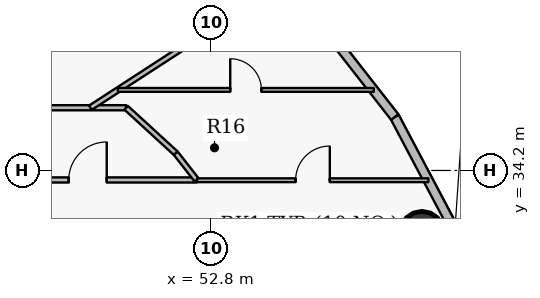
"""IFC4 building model, lengths in metres.
Left out: names, types, materials, properties, quantities, classifications, styles, units other than length and angle.
Written with IfcOpenShell. Run it as: python <this file> out.ifc"""

import sys

from ifc_helpers import new_model, si_unit, direction, frame, frame_2d, origin, origin_2d, place, context, subcontext, project, spatial, rectangle, hollow_circle, extrude, source, transform, mapped, element, fill, save


model = new_model("IFC4")
c1 = context("Model", 3, precision=1e-05, world=origin(), true_north=direction((0.0, 1.0)))
c2 = subcontext(c1, "Body", "Model", "MODEL_VIEW")
j1 = project(units=[si_unit("LENGTHUNIT", "METRE"), si_unit("PLANEANGLEUNIT", "RADIAN")], contexts=[c1])
p1 = place(None, origin())
s1 = spatial("IfcSite", under=j1, at=p1, CompositionType="ELEMENT")
p2 = place(p1, origin())
s2 = spatial("IfcBuilding", under=s1, at=p2, CompositionType="ELEMENT")
p3 = place(p2, frame((0.0, 0.0, 221.55)))
s3 = spatial("IfcBuildingStorey", under=s2, at=p3, CompositionType="ELEMENT", Elevation=221.55)
p4 = place(p3, frame((58.351, 32.549, 0.0), z_axis=(0.0, 0.0, 1.0), x_axis=(1.0, 0.0, 0.0)))
e1 = element("IfcColumn", 1, at=p4, inside=s3, PredefinedType="COLUMN", context=c2, shape_type="SweptSolid", body=[
    extrude(hollow_circle(Radius=0.575, WallThickness=0.036, at=origin_2d()), origin(), (0.0, 0.0, 1.0), 3.75),
])
p5 = place(p3, frame((57.636, 35.605, 0.0), z_axis=(0.0, 0.0, 1.0), x_axis=(0.46766049993, -0.883908172157, 0.0)))
e2 = element("IfcWall", 2, at=p5, inside=s3, PredefinedType="SOLIDWALL", context=c2, shape_type="SweptSolid", body=[
    extrude(rectangle(XDim=3.11, YDim=0.24, at=frame_2d((1.555, 0.0))), origin(), (0.0, 0.0, 1.0), 3.5),
])
p6 = place(p3, frame((55.648, 38.145, 0.0), z_axis=(0.0, 0.0, 1.0), x_axis=(0.616312344705, -0.787501805562, 0.0)))
e3 = element("IfcWall", 3, at=p6, inside=s3, PredefinedType="SOLIDWALL", context=c2, shape_type="SweptSolid", body=[
    extrude(rectangle(XDim=3.225, YDim=0.24, at=frame_2d((1.612, 0.0))), origin(), (0.0, 0.0, 1.0), 3.5),
])
p7 = place(p3, frame((24.35, 35.85, 0.0), z_axis=(0.0, 0.0, 1.0), x_axis=(1.0, 0.0, 0.0)))
e4 = element("IfcWall", 4, at=p7, inside=s3, PredefinedType="PARTITIONING", context=c2, shape_type="SweptSolid", body=[
    extrude(rectangle(XDim=26.218, YDim=0.135, at=frame_2d((13.109, 0.0))), origin(), (0.0, 0.0, 1.0), 2.935),
])
p8 = place(p7, frame((21.507, 0.0, 0.0)))
e5 = element("IfcOpeningElement", 5, at=p8, cuts=e4, PredefinedType="OPENING", context=c2, shape_type="SweptSolid", body=[
    extrude(rectangle(XDim=1.0, YDim=2.15, at=origin_2d()), frame((0.5, 0.078, 1.075), z_axis=(0.0, -1.0, 0.0), x_axis=(1.0, 0.0, 0.0)), (0.0, 0.0, 1.0), 0.155),
])
p9 = place(p7, frame((12.95, 0.0, 0.0)))
e6 = element("IfcOpeningElement", 6, at=p9, cuts=e4, PredefinedType="OPENING", context=c2, shape_type="SweptSolid", body=[
    extrude(rectangle(XDim=1.0, YDim=2.15, at=origin_2d()), frame((0.5, 0.078, 1.075), z_axis=(0.0, -1.0, 0.0), x_axis=(1.0, 0.0, 0.0)), (0.0, 0.0, 1.0), 0.155),
])
p10 = place(p7, frame((2.293, 0.0, 0.0)))
e7 = element("IfcOpeningElement", 7, at=p10, cuts=e4, PredefinedType="OPENING", context=c2, shape_type="SweptSolid", body=[
    extrude(rectangle(XDim=1.0, YDim=2.15, at=origin_2d()), frame((0.5, 0.078, 1.075), z_axis=(0.0, -1.0, 0.0), x_axis=(1.0, 0.0, 0.0)), (0.0, 0.0, 1.0), 0.155),
])
p11 = place(p3, frame((46.691, 33.95, 0.0), z_axis=(0.0, 0.0, 1.0), x_axis=(1.0, 0.0, 0.0)))
e8 = element("IfcWall", 8, at=p11, inside=s3, PredefinedType="PARTITIONING", context=c2, shape_type="SweptSolid", body=[
    extrude(rectangle(XDim=5.733, YDim=0.135, at=frame_2d((2.866, 0.0))), origin(), (0.0, 0.0, 1.0), 3.5),
])
p12 = place(p11, frame((2.366, 0.0, 0.0)))
e9 = element("IfcOpeningElement", 9, at=p12, cuts=e8, PredefinedType="OPENING", context=c2, shape_type="SweptSolid", body=[
    extrude(rectangle(XDim=1.0, YDim=2.15, at=origin_2d()), frame((0.5, 0.078, 1.075), z_axis=(0.0, -1.0, 0.0), x_axis=(1.0, 0.0, 0.0)), (0.0, 0.0, 1.0), 0.155),
])
p13 = place(p3, frame((49.628, 35.85, 0.0), z_axis=(0.0, 0.0, 1.0), x_axis=(0.838688976762, 0.544610686875, 0.0)))
e10 = element("IfcWall", 10, at=p13, inside=s3, PredefinedType="PARTITIONING", context=c2, shape_type="SweptSolid", body=[
    extrude(rectangle(XDim=5.954, YDim=0.135, at=frame_2d((2.977, 0.0))), origin(), (0.0, 0.0, 1.0), 2.985),
])
p14 = place(p3, frame((50.351, 36.319, 0.0), z_axis=(0.0, 0.0, 1.0), x_axis=(1.0, 0.0, 0.0)))
e11 = element("IfcWall", 11, at=p14, inside=s3, PredefinedType="PARTITIONING", context=c2, shape_type="SweptSolid", body=[
    extrude(rectangle(XDim=6.733, YDim=0.1, at=frame_2d((3.366, 0.0))), origin(), (0.0, 0.0, 1.0), 2.985),
])
p15 = place(p14, frame((2.956, 0.0, 0.0)))
e12 = element("IfcOpeningElement", 12, at=p15, cuts=e11, PredefinedType="OPENING", context=c2, shape_type="SweptSolid", body=[
    extrude(rectangle(XDim=0.82, YDim=2.1, at=origin_2d()), frame((0.41, 0.06, 1.05), z_axis=(0.0, -1.0, 0.0), x_axis=(1.0, 0.0, 0.0)), (0.0, 0.0, 1.0), 0.12),
])
p16 = place(p3, frame((50.568, 35.85, 0.0), z_axis=(0.0, 0.0, 1.0), x_axis=(0.737102657331, -0.675780787353, 0.0)))
e13 = element("IfcWall", 13, at=p16, inside=s3, PredefinedType="PARTITIONING", context=c2, shape_type="SweptSolid", body=[
    extrude(rectangle(XDim=1.772, YDim=0.135, at=frame_2d((0.886, 0.0))), origin(), (0.0, 0.0, 1.0), 3.5),
])
p17 = place(p3, frame((51.874, 34.653, 0.0), z_axis=(0.0, 0.0, 1.0), x_axis=(0.61628613448, -0.787522317429, 0.0)))
e14 = element("IfcWall", 14, at=p17, inside=s3, PredefinedType="PARTITIONING", context=c2, shape_type="SweptSolid", body=[
    extrude(rectangle(XDim=0.893, YDim=0.135, at=frame_2d((0.446, 0.0))), origin(), (0.0, 0.0, 1.0), 3.5),
])
p18 = place(p3, frame((52.434, 33.943, 0.0), z_axis=(0.0, 0.0, 1.0), x_axis=(1.0, 0.0, 0.0)))
e15 = element("IfcWall", 15, at=p18, inside=s3, PredefinedType="PARTITIONING", context=c2, shape_type="SweptSolid", body=[
    extrude(rectangle(XDim=6.087, YDim=0.1, at=frame_2d((3.043, 0.0))), origin(), (0.0, 0.0, 1.0), 2.985),
])
p19 = place(p18, frame((2.594, 0.0, 0.0)))
e16 = element("IfcOpeningElement", 16, at=p19, cuts=e15, PredefinedType="OPENING", context=c2, shape_type="SweptSolid", body=[
    extrude(rectangle(XDim=0.9, YDim=2.1, at=origin_2d()), frame((0.45, 0.06, 1.05), z_axis=(0.0, -1.0, 0.0), x_axis=(1.0, 0.0, 0.0)), (0.0, 0.0, 1.0), 0.12),
])
m1 = source(origin(), c2, "Body", "SweptSolid", [
    extrude(rectangle(XDim=1.0, YDim=2.15, at=origin_2d()), frame((0.5, 0.025, 1.075), z_axis=(0.0, -1.0, 0.0), x_axis=(1.0, 0.0, 0.0)), (0.0, 0.0, 1.0), 0.05),
])
p20 = place(p12, origin())
e17 = element("IfcDoor", 17, at=p20, inside=s3, OperationType="SINGLE_SWING_RIGHT", PredefinedType="DOOR", context=c2, shape_type="MappedRepresentation", body=[
    mapped(m1, transform((0.0, 0.0, 0.0), x_axis=(1.0, 0.0, 0.0), y_axis=(0.0, 1.0, 0.0), z_axis=(0.0, 0.0, 1.0), scale=1.0)),
])
fill(e9, e17)
m2 = source(origin(), c2, "Body", "SweptSolid", [
    extrude(rectangle(XDim=0.9, YDim=2.1, at=origin_2d()), frame((0.45, 0.025, 1.05), z_axis=(0.0, -1.0, 0.0), x_axis=(1.0, 0.0, 0.0)), (0.0, 0.0, 1.0), 0.05),
])
p21 = place(p19, origin())
e18 = element("IfcDoor", 18, at=p21, inside=s3, OperationType="SINGLE_SWING_RIGHT", PredefinedType="DOOR", context=c2, shape_type="MappedRepresentation", body=[
    mapped(m2, transform((0.0, 0.0, 0.0), x_axis=(1.0, 0.0, 0.0), y_axis=(0.0, 1.0, 0.0), z_axis=(0.0, 0.0, 1.0), scale=1.0)),
])
fill(e16, e18)
m3 = source(origin(), c2, "Body", "SweptSolid", [
    extrude(rectangle(XDim=0.82, YDim=2.1, at=origin_2d()), frame((0.41, 0.025, 1.05), z_axis=(0.0, -1.0, 0.0), x_axis=(1.0, 0.0, 0.0)), (0.0, 0.0, 1.0), 0.05),
])
p22 = place(p15, origin())
e19 = element("IfcDoor", 19, at=p22, inside=s3, OperationType="SINGLE_SWING_LEFT", PredefinedType="DOOR", context=c2, shape_type="MappedRepresentation", body=[
    mapped(m3, transform((0.0, 0.0, 0.0), x_axis=(1.0, 0.0, 0.0), y_axis=(0.0, 1.0, 0.0), z_axis=(0.0, 0.0, 1.0), scale=1.0)),
])
fill(e12, e19)
save(model, sys.argv[1])
